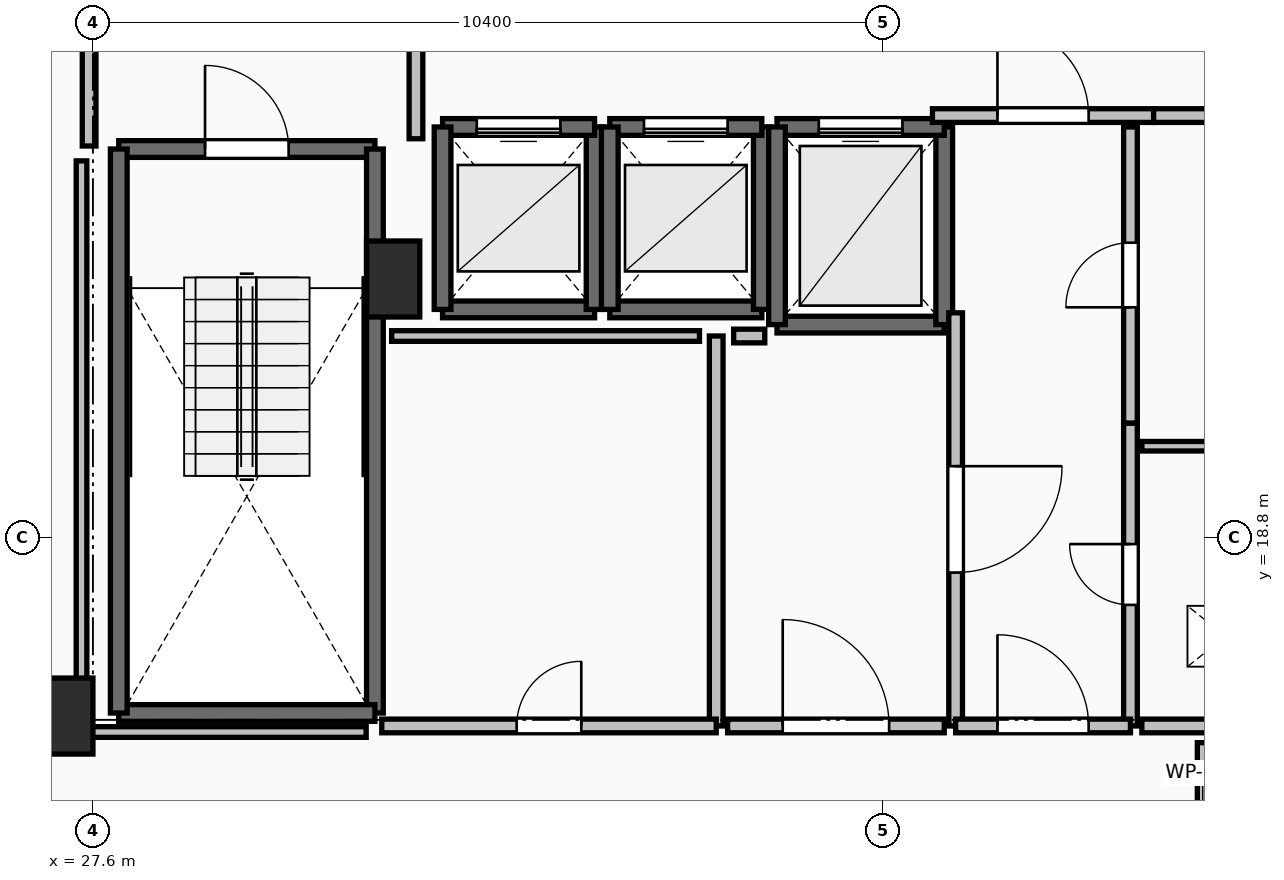
"""IFC4 building model, lengths in metres.
Left out: names, types, materials, properties, quantities, classifications, styles, units other than length and angle.
Written with IfcOpenShell. Run it as: python <this file> out.ifc"""

import sys

from ifc_helpers import new_model, si_unit, direction, frame, frame_2d, origin, origin_2d, place, context, subcontext, project, spatial, rectangle, extrude, element, fill, save


model = new_model("IFC4")
c1 = context("Model", 3, precision=1e-05, world=origin(), true_north=direction((0.0, 1.0)))
c2 = subcontext(c1, "Body", "Model", "MODEL_VIEW")
j1 = project(units=[si_unit("LENGTHUNIT", "METRE"), si_unit("PLANEANGLEUNIT", "RADIAN")], contexts=[c1])
p1 = place(None, origin())
s1 = spatial("IfcSite", under=j1, at=p1, CompositionType="ELEMENT")
p2 = place(p1, origin())
s2 = spatial("IfcBuilding", under=s1, at=p2, CompositionType="ELEMENT")
p3 = place(p2, frame((0.0, 0.0, 196.6)))
s3 = spatial("IfcBuildingStorey", under=s2, at=p3, CompositionType="ELEMENT", Elevation=196.6)
for number, where, z_axis, x_axis in (
    (1, (27.25, 16.45, 0.0), (0.0, 0.0, 1.0), (1.0, 0.0, 0.0)),
    (2, (31.55, 22.2, 0.0), (0.0, 0.0, 1.0), (1.0, 0.0, 0.0)),
):
    element("IfcColumn", number, at=place(p3, frame(where, z_axis=z_axis, x_axis=x_axis)), inside=s3, PredefinedType="PILASTER", context=c2, shape_type="SweptSolid", body=[
        extrude(rectangle(XDim=0.7, YDim=1.0, at=origin_2d()), origin(), (0.0, 0.0, 1.0), 3.5),
    ])
p4 = place(p3, frame((27.94, 23.91, 0.0), z_axis=(0.0, 0.0, 1.0), x_axis=(1.0, 0.0, 0.0)))
e3 = element("IfcWall", 3, at=p4, inside=s3, PredefinedType="SOLIDWALL", context=c2, shape_type="SweptSolid", body=[
    extrude(rectangle(XDim=3.37, YDim=0.22, at=frame_2d((1.685, 0.0))), origin(), (0.0, 0.0, 1.0), 3.24),
])
p5 = place(p4, frame((1.135, 0.0, 0.0)))
e4 = element("IfcOpeningElement", 4, at=p5, cuts=e3, PredefinedType="OPENING", context=c2, shape_type="SweptSolid", body=[
    extrude(rectangle(XDim=1.1, YDim=2.15, at=frame_2d((0.55, 1.075))), frame((0.0, 0.125, 0.0), z_axis=(0.0, -1.0, 0.0), x_axis=(1.0, 0.0, 0.0)), (0.0, 0.0, 1.0), 0.25),
])
p6 = place(p3, frame((31.31, 23.91, 0.0), z_axis=(0.0, 0.0, 1.0), x_axis=(0.0, -1.0, 0.0)))
e5 = element("IfcWall", 5, at=p6, inside=s3, PredefinedType="SOLIDWALL", context=c2, shape_type="SweptSolid", body=[
    extrude(rectangle(XDim=7.42, YDim=0.22, at=frame_2d((3.71, 0.0))), origin(), (0.0, 0.0, 1.0), 3.24),
])
p7 = place(p3, frame((31.31, 16.49, 0.0), z_axis=(0.0, 0.0, 1.0), x_axis=(-1.0, 0.0, 0.0)))
e6 = element("IfcWall", 6, at=p7, inside=s3, PredefinedType="SOLIDWALL", context=c2, shape_type="SweptSolid", body=[
    extrude(rectangle(XDim=3.37, YDim=0.22, at=frame_2d((1.685, 0.0))), origin(), (0.0, 0.0, 1.0), 3.24),
])
p8 = place(p3, frame((27.94, 16.49, 0.0), z_axis=(0.0, 0.0, 1.0), x_axis=(0.0, 1.0, 0.0)))
e7 = element("IfcWall", 7, at=p8, inside=s3, PredefinedType="SOLIDWALL", context=c2, shape_type="SweptSolid", body=[
    extrude(rectangle(XDim=7.42, YDim=0.22, at=frame_2d((3.71, 0.0))), origin(), (0.0, 0.0, 1.0), 3.24),
])
p9 = place(p3, frame((32.2, 21.8, 0.0), z_axis=(0.0, 0.0, 1.0), x_axis=(1.0, 0.0, 0.0)))
e8 = element("IfcWall", 8, at=p9, inside=s3, PredefinedType="SOLIDWALL", context=c2, shape_type="SweptSolid", body=[
    extrude(rectangle(XDim=2.0, YDim=0.22, at=frame_2d((1.0, 0.0))), origin(), (0.0, 0.0, 1.0), 3.24),
])
p10 = place(p3, frame((34.2, 21.8, 0.0), z_axis=(0.0, 0.0, 1.0), x_axis=(0.0, 1.0, 0.0)))
e9 = element("IfcWall", 9, at=p10, inside=s3, PredefinedType="SOLIDWALL", context=c2, shape_type="SweptSolid", body=[
    extrude(rectangle(XDim=2.4, YDim=0.22, at=frame_2d((1.2, 0.0))), origin(), (0.0, 0.0, 1.0), 3.24),
])
p11 = place(p3, frame((34.2, 24.2, 0.0), z_axis=(0.0, 0.0, 1.0), x_axis=(-1.0, 0.0, 0.0)))
e10 = element("IfcWall", 10, at=p11, inside=s3, PredefinedType="SOLIDWALL", context=c2, shape_type="SweptSolid", body=[
    extrude(rectangle(XDim=2.0, YDim=0.22, at=frame_2d((1.0, 0.0))), origin(), (0.0, 0.0, 1.0), 3.24),
])
p12 = place(p11, frame((0.45, 0.0, 0.0)))
e11 = element("IfcOpeningElement", 11, at=p12, cuts=e10, PredefinedType="OPENING", context=c2, shape_type="SweptSolid", body=[
    extrude(rectangle(XDim=1.1, YDim=2.2, at=frame_2d((0.55, 1.1))), frame((0.0, 0.125, 0.0), z_axis=(0.0, -1.0, 0.0), x_axis=(1.0, 0.0, 0.0)), (0.0, 0.0, 1.0), 0.25),
])
p13 = place(p3, frame((32.2, 24.2, 0.0), z_axis=(0.0, 0.0, 1.0), x_axis=(0.0, -1.0, 0.0)))
e12 = element("IfcWall", 12, at=p13, inside=s3, PredefinedType="SOLIDWALL", context=c2, shape_type="SweptSolid", body=[
    extrude(rectangle(XDim=2.4, YDim=0.22, at=frame_2d((1.2, 0.0))), origin(), (0.0, 0.0, 1.0), 3.24),
])
p14 = place(p3, frame((34.4, 21.8, 0.0), z_axis=(0.0, 0.0, 1.0), x_axis=(1.0, 0.0, 0.0)))
e13 = element("IfcWall", 13, at=p14, inside=s3, PredefinedType="SOLIDWALL", context=c2, shape_type="SweptSolid", body=[
    extrude(rectangle(XDim=2.0, YDim=0.22, at=frame_2d((1.0, 0.0))), origin(), (0.0, 0.0, 1.0), 3.24),
])
p15 = place(p3, frame((36.4, 21.8, 0.0), z_axis=(0.0, 0.0, 1.0), x_axis=(0.0, 1.0, 0.0)))
e14 = element("IfcWall", 14, at=p15, inside=s3, PredefinedType="SOLIDWALL", context=c2, shape_type="SweptSolid", body=[
    extrude(rectangle(XDim=2.4, YDim=0.22, at=frame_2d((1.2, 0.0))), origin(), (0.0, 0.0, 1.0), 3.24),
])
p16 = place(p3, frame((36.4, 24.2, 0.0), z_axis=(0.0, 0.0, 1.0), x_axis=(-1.0, 0.0, 0.0)))
e15 = element("IfcWall", 15, at=p16, inside=s3, PredefinedType="SOLIDWALL", context=c2, shape_type="SweptSolid", body=[
    extrude(rectangle(XDim=2.0, YDim=0.22, at=frame_2d((1.0, 0.0))), origin(), (0.0, 0.0, 1.0), 3.24),
])
p17 = place(p16, frame((0.45, 0.0, 0.0)))
e16 = element("IfcOpeningElement", 16, at=p17, cuts=e15, PredefinedType="OPENING", context=c2, shape_type="SweptSolid", body=[
    extrude(rectangle(XDim=1.1, YDim=2.2, at=frame_2d((0.55, 1.1))), frame((0.0, 0.125, 0.0), z_axis=(0.0, -1.0, 0.0), x_axis=(1.0, 0.0, 0.0)), (0.0, 0.0, 1.0), 0.25),
])
p18 = place(p3, frame((34.4, 24.2, 0.0), z_axis=(0.0, 0.0, 1.0), x_axis=(0.0, -1.0, 0.0)))
e17 = element("IfcWall", 17, at=p18, inside=s3, PredefinedType="SOLIDWALL", context=c2, shape_type="SweptSolid", body=[
    extrude(rectangle(XDim=2.4, YDim=0.22, at=frame_2d((1.2, 0.0))), origin(), (0.0, 0.0, 1.0), 3.24),
])
p19 = place(p3, frame((36.6, 21.6, 0.0), z_axis=(0.0, 0.0, 1.0), x_axis=(1.0, 0.0, 0.0)))
e18 = element("IfcWall", 18, at=p19, inside=s3, PredefinedType="SOLIDWALL", context=c2, shape_type="SweptSolid", body=[
    extrude(rectangle(XDim=2.2, YDim=0.22, at=frame_2d((1.1, 0.0))), origin(), (0.0, 0.0, 1.0), 3.24),
])
p20 = place(p3, frame((38.8, 21.6, 0.0), z_axis=(0.0, 0.0, 1.0), x_axis=(0.0, 1.0, 0.0)))
e19 = element("IfcWall", 19, at=p20, inside=s3, PredefinedType="SOLIDWALL", context=c2, shape_type="SweptSolid", body=[
    extrude(rectangle(XDim=2.6, YDim=0.22, at=frame_2d((1.3, 0.0))), origin(), (0.0, 0.0, 1.0), 3.24),
])
p21 = place(p3, frame((38.8, 24.2, 0.0), z_axis=(0.0, 0.0, 1.0), x_axis=(-1.0, 0.0, 0.0)))
e20 = element("IfcWall", 20, at=p21, inside=s3, PredefinedType="SOLIDWALL", context=c2, shape_type="SweptSolid", body=[
    extrude(rectangle(XDim=2.2, YDim=0.22, at=frame_2d((1.1, 0.0))), origin(), (0.0, 0.0, 1.0), 3.24),
])
p22 = place(p21, frame((0.55, 0.0, 0.0)))
e21 = element("IfcOpeningElement", 21, at=p22, cuts=e20, PredefinedType="OPENING", context=c2, shape_type="SweptSolid", body=[
    extrude(rectangle(XDim=1.1, YDim=2.2, at=frame_2d((0.55, 1.1))), frame((0.0, 0.125, 0.0), z_axis=(0.0, -1.0, 0.0), x_axis=(1.0, 0.0, 0.0)), (0.0, 0.0, 1.0), 0.25),
])
p23 = place(p3, frame((36.6, 24.2, 0.0), z_axis=(0.0, 0.0, 1.0), x_axis=(0.0, -1.0, 0.0)))
e22 = element("IfcWall", 22, at=p23, inside=s3, PredefinedType="SOLIDWALL", context=c2, shape_type="SweptSolid", body=[
    extrude(rectangle(XDim=2.6, YDim=0.22, at=frame_2d((1.3, 0.0))), origin(), (0.0, 0.0, 1.0), 3.24),
])
p24 = place(p3, frame((31.85, 24.045, 0.0), z_axis=(0.0, 0.0, 1.0), x_axis=(0.0, 1.0, 0.0)))
e23 = element("IfcWall", 23, at=p24, inside=s3, PredefinedType="PARTITIONING", context=c2, shape_type="SweptSolid", body=[
    extrude(rectangle(XDim=3.91, YDim=0.18, at=frame_2d((1.955, 0.0))), origin(), (0.0, 0.0, 1.0), 3.24),
])
p25 = place(p24, frame((1.355, 0.0, 0.0)))
e24 = element("IfcOpeningElement", 24, at=p25, cuts=e23, PredefinedType="OPENING", context=c2, shape_type="SweptSolid", body=[
    extrude(rectangle(XDim=1.2, YDim=2.15, at=frame_2d((0.6, 1.075))), frame((0.0, 0.105, 0.0), z_axis=(0.0, -1.0, 0.0), x_axis=(1.0, 0.0, 0.0)), (0.0, 0.0, 1.0), 0.21),
])
p26 = place(p3, frame((27.55, 28.0, 0.0), z_axis=(0.0, 0.0, 1.0), x_axis=(0.0, -1.0, 0.0)))
e25 = element("IfcWall", 25, at=p26, inside=s3, PredefinedType="PARTITIONING", context=c2, shape_type="SweptSolid", body=[
    extrude(rectangle(XDim=4.05, YDim=0.18, at=frame_2d((2.025, 0.0))), origin(), (0.0, 0.0, 1.0), 3.24),
])
p27 = place(p26, frame((1.425, 0.0, 0.0)))
e26 = element("IfcOpeningElement", 26, at=p27, cuts=e25, PredefinedType="OPENING", context=c2, shape_type="SweptSolid", body=[
    extrude(rectangle(XDim=1.2, YDim=2.15, at=frame_2d((0.6, 1.075))), frame((0.0, 0.105, 0.0), z_axis=(0.0, -1.0, 0.0), x_axis=(1.0, 0.0, 0.0)), (0.0, 0.0, 1.0), 0.21),
])
p28 = place(p3, frame((38.645, 24.35, 0.0), z_axis=(0.0, 0.0, 1.0), x_axis=(1.0, 0.0, 0.0)))
e27 = element("IfcWall", 27, at=p28, inside=s3, PredefinedType="PARTITIONING", context=c2, shape_type="SweptSolid", body=[
    extrude(rectangle(XDim=2.91, YDim=0.18, at=frame_2d((1.455, 0.0))), origin(), (0.0, 0.0, 1.0), 3.24),
])
p29 = place(p28, frame((0.855, 0.0, 0.0)))
e28 = element("IfcOpeningElement", 28, at=p29, cuts=e27, PredefinedType="OPENING", context=c2, shape_type="SweptSolid", body=[
    extrude(rectangle(XDim=1.2, YDim=2.15, at=frame_2d((0.6, 1.075))), frame((0.0, 0.105, 0.0), z_axis=(0.0, -1.0, 0.0), x_axis=(1.0, 0.0, 0.0)), (0.0, 0.0, 1.0), 0.21),
])
p30 = place(p3, frame((41.555, 24.35, 0.0), z_axis=(0.0, 0.0, 1.0), x_axis=(1.0, 0.0, 0.0)))
e29 = element("IfcWall", 29, at=p30, inside=s3, PredefinedType="PARTITIONING", context=c2, shape_type="SweptSolid", body=[
    extrude(rectangle(XDim=2.445, YDim=0.18, at=frame_2d((1.223, 0.0))), origin(), (0.0, 0.0, 1.0), 3.24),
])
p31 = place(p30, frame((0.798, 0.0, 0.0)))
e30 = element("IfcOpeningElement", 30, at=p31, cuts=e29, PredefinedType="OPENING", context=c2, shape_type="SweptSolid", body=[
    extrude(rectangle(XDim=0.85, YDim=2.1, at=frame_2d((0.425, 1.05))), frame((0.0, 0.105, 0.0), z_axis=(0.0, -1.0, 0.0), x_axis=(1.0, 0.0, 0.0)), (0.0, 0.0, 1.0), 0.21),
])
p32 = place(p3, frame((41.25, 16.32, 0.0), z_axis=(0.0, 0.0, 1.0), x_axis=(0.0, 1.0, 0.0)))
e31 = element("IfcWall", 31, at=p32, inside=s3, PredefinedType="PARTITIONING", context=c2, shape_type="SweptSolid", body=[
    extrude(rectangle(XDim=3.985, YDim=0.18, at=frame_2d((1.992, 0.0))), origin(), (0.0, 0.0, 1.0), 3.24),
])
p33 = place(p32, frame((1.593, 0.0, 0.0)))
e32 = element("IfcOpeningElement", 32, at=p33, cuts=e31, PredefinedType="OPENING", context=c2, shape_type="SweptSolid", body=[
    extrude(rectangle(XDim=0.8, YDim=2.05, at=frame_2d((0.4, 1.025))), frame((0.0, 0.105, 0.0), z_axis=(0.0, -1.0, 0.0), x_axis=(1.0, 0.0, 0.0)), (0.0, 0.0, 1.0), 0.21),
])
p34 = place(p3, frame((41.25, 20.305, 0.0), z_axis=(0.0, 0.0, 1.0), x_axis=(0.0, 1.0, 0.0)))
e33 = element("IfcWall", 33, at=p34, inside=s3, PredefinedType="PARTITIONING", context=c2, shape_type="SweptSolid", body=[
    extrude(rectangle(XDim=3.895, YDim=0.18, at=frame_2d((1.948, 0.0))), origin(), (0.0, 0.0, 1.0), 3.24),
])
p35 = place(p34, frame((1.522, 0.0, 0.0)))
e34 = element("IfcOpeningElement", 34, at=p35, cuts=e33, PredefinedType="OPENING", context=c2, shape_type="SweptSolid", body=[
    extrude(rectangle(XDim=0.85, YDim=2.1, at=frame_2d((0.425, 1.05))), frame((0.0, 0.105, 0.0), z_axis=(0.0, -1.0, 0.0), x_axis=(1.0, 0.0, 0.0)), (0.0, 0.0, 1.0), 0.21),
])
p36 = place(p3, frame((38.95, 21.755, 0.0), z_axis=(0.0, 0.0, 1.0), x_axis=(0.0, -1.0, 0.0)))
e35 = element("IfcWall", 35, at=p36, inside=s3, PredefinedType="PARTITIONING", context=c2, shape_type="SweptSolid", body=[
    extrude(rectangle(XDim=5.435, YDim=0.18, at=frame_2d((2.717, 0.0))), origin(), (0.0, 0.0, 1.0), 3.24),
])
p37 = place(p36, frame((2.018, 0.0, 0.0)))
e36 = element("IfcOpeningElement", 36, at=p37, cuts=e35, PredefinedType="OPENING", context=c2, shape_type="SweptSolid", body=[
    extrude(rectangle(XDim=1.4, YDim=2.2, at=frame_2d((0.7, 1.1))), frame((0.0, 0.105, 0.0), z_axis=(0.0, -1.0, 0.0), x_axis=(1.0, 0.0, 0.0)), (0.0, 0.0, 1.0), 0.21),
])
p38 = place(p3, frame((38.95, 16.32, 0.0), z_axis=(0.0, 0.0, 1.0), x_axis=(1.0, 0.0, 0.0)))
e37 = element("IfcWall", 37, at=p38, inside=s3, PredefinedType="PARTITIONING", context=c2, shape_type="SweptSolid", body=[
    extrude(rectangle(XDim=2.3, YDim=0.18, at=frame_2d((1.15, 0.0))), origin(), (0.0, 0.0, 1.0), 3.24),
])
p39 = place(p38, frame((0.55, 0.0, 0.0)))
e38 = element("IfcOpeningElement", 38, at=p39, cuts=e37, PredefinedType="OPENING", context=c2, shape_type="SweptSolid", body=[
    extrude(rectangle(XDim=1.2, YDim=2.15, at=frame_2d((0.6, 1.075))), frame((0.0, 0.105, 0.0), z_axis=(0.0, -1.0, 0.0), x_axis=(1.0, 0.0, 0.0)), (0.0, 0.0, 1.0), 0.21),
])
p40 = place(p3, frame((44.6, 20.0, 0.0), z_axis=(0.0, 0.0, 1.0), x_axis=(-1.0, 0.0, 0.0)))
e39 = element("IfcWall", 39, at=p40, inside=s3, PredefinedType="PARTITIONING", context=c2, shape_type="SweptSolid", body=[
    extrude(rectangle(XDim=3.2, YDim=0.125, at=frame_2d((1.6, 0.0))), origin(), (0.0, 0.0, 1.0), 3.24),
])
p41 = place(p3, frame((41.4, 16.32, 0.0), z_axis=(0.0, 0.0, 1.0), x_axis=(1.0, 0.0, 0.0)))
e40 = element("IfcWall", 40, at=p41, inside=s3, PredefinedType="PARTITIONING", context=c2, shape_type="SweptSolid", body=[
    extrude(rectangle(XDim=3.2, YDim=0.18, at=frame_2d((1.6, 0.0))), origin(), (0.0, 0.0, 1.0), 3.24),
])
p42 = place(p41, frame((1.2, 0.0, 0.0)))
e41 = element("IfcOpeningElement", 41, at=p42, cuts=e40, PredefinedType="OPENING", context=c2, shape_type="SweptSolid", body=[
    extrude(rectangle(XDim=0.8, YDim=2.05, at=frame_2d((0.4, 1.025))), frame((0.0, 0.105, 0.0), z_axis=(0.0, -1.0, 0.0), x_axis=(1.0, 0.0, 0.0)), (0.0, 0.0, 1.0), 0.21),
])
p43 = place(p3, frame((35.8, 16.32, 0.0), z_axis=(0.0, 0.0, 1.0), x_axis=(0.0, 1.0, 0.0)))
e42 = element("IfcWall", 42, at=p43, inside=s3, PredefinedType="PARTITIONING", context=c2, shape_type="SweptSolid", body=[
    extrude(rectangle(XDim=5.13, YDim=0.18, at=frame_2d((2.565, 0.0))), origin(), (0.0, 0.0, 1.0), 3.24),
])
p44 = place(p3, frame((31.4, 16.32, 0.0), z_axis=(0.0, 0.0, 1.0), x_axis=(1.0, 0.0, 0.0)))
e43 = element("IfcWall", 43, at=p44, inside=s3, PredefinedType="PARTITIONING", context=c2, shape_type="SweptSolid", body=[
    extrude(rectangle(XDim=4.4, YDim=0.18, at=frame_2d((2.2, 0.0))), origin(), (0.0, 0.0, 1.0), 3.24),
])
p45 = place(p44, frame((1.775, 0.0, 0.0)))
e44 = element("IfcOpeningElement", 44, at=p45, cuts=e43, PredefinedType="OPENING", context=c2, shape_type="SweptSolid", body=[
    extrude(rectangle(XDim=0.85, YDim=2.1, at=frame_2d((0.425, 1.05))), frame((0.0, 0.105, 0.0), z_axis=(0.0, -1.0, 0.0), x_axis=(1.0, 0.0, 0.0)), (0.0, 0.0, 1.0), 0.21),
])
p46 = place(p3, frame((35.95, 16.32, 0.0), z_axis=(0.0, 0.0, 1.0), x_axis=(1.0, 0.0, 0.0)))
e45 = element("IfcWall", 45, at=p46, inside=s3, PredefinedType="PARTITIONING", context=c2, shape_type="SweptSolid", body=[
    extrude(rectangle(XDim=2.85, YDim=0.18, at=frame_2d((1.425, 0.0))), origin(), (0.0, 0.0, 1.0), 3.24),
])
p47 = place(p46, frame((0.725, 0.0, 0.0)))
e46 = element("IfcOpeningElement", 46, at=p47, cuts=e45, PredefinedType="OPENING", context=c2, shape_type="SweptSolid", body=[
    extrude(rectangle(XDim=1.4, YDim=2.2, at=frame_2d((0.7, 1.1))), frame((0.0, 0.105, 0.0), z_axis=(0.0, -1.0, 0.0), x_axis=(1.0, 0.0, 0.0)), (0.0, 0.0, 1.0), 0.21),
])
p48 = place(p3, frame((35.58, 21.45, 0.0), z_axis=(0.0, 0.0, 1.0), x_axis=(-1.0, 0.0, 0.0)))
e47 = element("IfcWall", 47, at=p48, inside=s3, PredefinedType="PARTITIONING", context=c2, shape_type="SweptSolid", body=[
    extrude(rectangle(XDim=4.05, YDim=0.14, at=frame_2d((2.025, 0.0))), origin(), (0.0, 0.0, 1.0), 3.24),
])
p49 = place(p3, frame((36.439, 21.45, 0.0), z_axis=(0.0, 0.0, 1.0), x_axis=(-1.0, 0.0, 0.0)))
e48 = element("IfcWall", 48, at=p49, inside=s3, PredefinedType="PARTITIONING", context=c2, shape_type="SweptSolid", body=[
    extrude(rectangle(XDim=0.409, YDim=0.18, at=frame_2d((0.205, 0.0))), origin(), (0.0, 0.0, 1.0), 3.24),
])
p50 = place(p3, frame((27.45, 23.754, 0.0), z_axis=(0.0, 0.0, 1.0), x_axis=(0.0, -1.0, 0.0)))
e49 = element("IfcWall", 49, at=p50, inside=s3, PredefinedType="PARTITIONING", context=c2, shape_type="SweptSolid", body=[
    extrude(rectangle(XDim=7.514, YDim=0.14, at=frame_2d((3.757, 0.0))), origin(), (0.0, 0.0, 1.0), 2.432),
])
p51 = place(p3, frame((27.45, 16.24, 0.0), z_axis=(0.0, 0.0, 1.0), x_axis=(1.0, 0.0, 0.0)))
e50 = element("IfcWall", 50, at=p51, inside=s3, PredefinedType="PARTITIONING", context=c2, shape_type="SweptSolid", body=[
    extrude(rectangle(XDim=3.745, YDim=0.14, at=frame_2d((1.873, 0.0))), origin(), (0.0, 0.0, 1.0), 2.432),
])
p52 = place(p3, frame((42.2, 16.1, 0.0), z_axis=(0.0, 0.0, 1.0), x_axis=(0.0, -1.0, 0.0)))
e51 = element("IfcWall", 51, at=p52, inside=s3, PredefinedType="PARTITIONING", context=c2, shape_type="SweptSolid", body=[
    extrude(rectangle(XDim=1.705, YDim=0.14, at=frame_2d((0.853, 0.0))), origin(), (0.0, 0.0, 1.0), 3.24),
])
p53 = place(p5, origin())
e52 = element("IfcDoor", 52, at=p53, inside=s3, OperationType="SINGLE_SWING_LEFT", PredefinedType="DOOR", context=c2, shape_type="SweptSolid", body=[
    extrude(rectangle(XDim=1.1, YDim=2.15, at=frame_2d((0.55, 1.075))), frame((0.0, 0.025, 0.0), z_axis=(0.0, -1.0, 0.0), x_axis=(1.0, 0.0, 0.0)), (0.0, 0.0, 1.0), 0.05),
])
fill(e4, e52)
p54 = place(p12, origin())
e53 = element("IfcDoor", 53, at=p54, inside=s3, OperationType="SLIDING_TO_LEFT", PredefinedType="DOOR", context=c2, shape_type="SweptSolid", body=[
    extrude(rectangle(XDim=1.1, YDim=2.2, at=frame_2d((0.55, 1.1))), frame((0.0, 0.025, 0.0), z_axis=(0.0, -1.0, 0.0), x_axis=(1.0, 0.0, 0.0)), (0.0, 0.0, 1.0), 0.05),
])
fill(e11, e53)
p55 = place(p17, origin())
e54 = element("IfcDoor", 54, at=p55, inside=s3, OperationType="SLIDING_TO_LEFT", PredefinedType="DOOR", context=c2, shape_type="SweptSolid", body=[
    extrude(rectangle(XDim=1.1, YDim=2.2, at=frame_2d((0.55, 1.1))), frame((0.0, 0.025, 0.0), z_axis=(0.0, -1.0, 0.0), x_axis=(1.0, 0.0, 0.0)), (0.0, 0.0, 1.0), 0.05),
])
fill(e16, e54)
p56 = place(p22, origin())
e55 = element("IfcDoor", 55, at=p56, inside=s3, OperationType="SLIDING_TO_LEFT", PredefinedType="DOOR", context=c2, shape_type="SweptSolid", body=[
    extrude(rectangle(XDim=1.1, YDim=2.2, at=frame_2d((0.55, 1.1))), frame((0.0, 0.025, 0.0), z_axis=(0.0, -1.0, 0.0), x_axis=(1.0, 0.0, 0.0)), (0.0, 0.0, 1.0), 0.05),
])
fill(e21, e55)
p57 = place(p29, origin())
e56 = element("IfcDoor", 56, at=p57, inside=s3, OperationType="SINGLE_SWING_LEFT", PredefinedType="DOOR", context=c2, shape_type="SweptSolid", body=[
    extrude(rectangle(XDim=1.2, YDim=2.15, at=frame_2d((0.6, 1.075))), frame((0.0, 0.025, 0.0), z_axis=(0.0, -1.0, 0.0), x_axis=(1.0, 0.0, 0.0)), (0.0, 0.0, 1.0), 0.05),
])
fill(e28, e56)
p58 = place(p33, origin())
e57 = element("IfcDoor", 57, at=p58, inside=s3, OperationType="SINGLE_SWING_RIGHT", PredefinedType="DOOR", context=c2, shape_type="SweptSolid", body=[
    extrude(rectangle(XDim=0.8, YDim=2.05, at=frame_2d((0.4, 1.025))), frame((0.0, 0.025, 0.0), z_axis=(0.0, -1.0, 0.0), x_axis=(1.0, 0.0, 0.0)), (0.0, 0.0, 1.0), 0.05),
])
fill(e32, e57)
p59 = place(p35, origin())
e58 = element("IfcDoor", 58, at=p59, inside=s3, OperationType="SINGLE_SWING_LEFT", PredefinedType="DOOR", context=c2, shape_type="SweptSolid", body=[
    extrude(rectangle(XDim=0.85, YDim=2.1, at=frame_2d((0.425, 1.05))), frame((0.0, 0.025, 0.0), z_axis=(0.0, -1.0, 0.0), x_axis=(1.0, 0.0, 0.0)), (0.0, 0.0, 1.0), 0.05),
])
fill(e34, e58)
p60 = place(p37, origin())
e59 = element("IfcDoor", 59, at=p60, inside=s3, OperationType="DOUBLE_SWING_LEFT", PredefinedType="DOOR", context=c2, shape_type="SweptSolid", body=[
    extrude(rectangle(XDim=1.4, YDim=2.2, at=frame_2d((0.7, 1.1))), frame((0.0, 0.025, 0.0), z_axis=(0.0, -1.0, 0.0), x_axis=(1.0, 0.0, 0.0)), (0.0, 0.0, 1.0), 0.05),
])
fill(e36, e59)
p61 = place(p39, origin())
e60 = element("IfcDoor", 60, at=p61, inside=s3, OperationType="SINGLE_SWING_LEFT", PredefinedType="DOOR", context=c2, shape_type="SweptSolid", body=[
    extrude(rectangle(XDim=1.2, YDim=2.15, at=frame_2d((0.6, 1.075))), frame((0.0, 0.025, 0.0), z_axis=(0.0, -1.0, 0.0), x_axis=(1.0, 0.0, 0.0)), (0.0, 0.0, 1.0), 0.05),
])
fill(e38, e60)
p62 = place(p45, origin())
e61 = element("IfcDoor", 61, at=p62, inside=s3, OperationType="SINGLE_SWING_RIGHT", PredefinedType="DOOR", context=c2, shape_type="SweptSolid", body=[
    extrude(rectangle(XDim=0.85, YDim=2.1, at=frame_2d((0.425, 1.05))), frame((0.0, 0.025, 0.0), z_axis=(0.0, -1.0, 0.0), x_axis=(1.0, 0.0, 0.0)), (0.0, 0.0, 1.0), 0.05),
])
fill(e44, e61)
p63 = place(p47, origin())
e62 = element("IfcDoor", 62, at=p63, inside=s3, OperationType="DOUBLE_SWING_LEFT", PredefinedType="DOOR", context=c2, shape_type="SweptSolid", body=[
    extrude(rectangle(XDim=1.4, YDim=2.2, at=frame_2d((0.7, 1.1))), frame((0.0, 0.025, 0.0), z_axis=(0.0, -1.0, 0.0), x_axis=(1.0, 0.0, 0.0)), (0.0, 0.0, 1.0), 0.05),
])
fill(e46, e62)
save(model, sys.argv[1])
